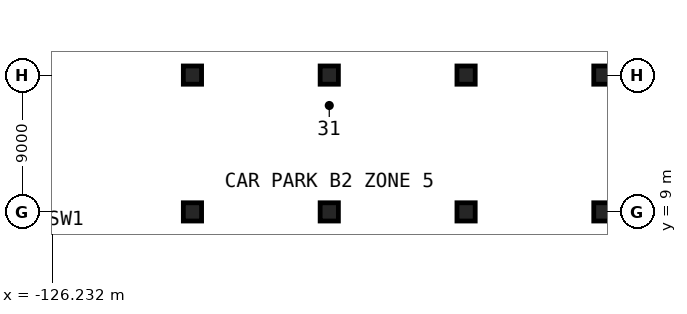
"""IFC4 building model, lengths in metres.
Left out: names, types, materials, properties, quantities, classifications, styles, units other than length and angle.
Written with IfcOpenShell. Run it as: python <this file> out.ifc"""

import sys

from ifc_helpers import new_model, si_unit, direction, frame, origin, origin_2d, place, context, subcontext, project, spatial, rectangle, extrude, element, save


model = new_model("IFC4")
c1 = context("Model", 3, precision=1e-05, world=origin(), true_north=direction((0.0, 1.0)))
c2 = subcontext(c1, "Body", "Model", "MODEL_VIEW")
j1 = project(units=[si_unit("LENGTHUNIT", "METRE"), si_unit("PLANEANGLEUNIT", "RADIAN")], contexts=[c1])
p1 = place(None, origin())
s1 = spatial("IfcSite", under=j1, at=p1, CompositionType="ELEMENT")
p2 = place(p1, origin())
s2 = spatial("IfcBuilding", under=s1, at=p2, CompositionType="ELEMENT")
p3 = place(p2, frame((0.0, 0.0, -9.0)))
s3 = spatial("IfcBuildingStorey", under=s2, at=p3, CompositionType="ELEMENT", Elevation=-9.0)
for number, where, z_axis, x_axis in (
    (1, (-117.0, 9.0, 0.0), (0.0, 0.0, 1.0), (1.0, 0.0, 0.0)),
    (2, (-117.0, 18.0, 0.0), (0.0, 0.0, 1.0), (1.0, 0.0, 0.0)),
    (3, (-108.0, 9.0, 0.0), (0.0, 0.0, 1.0), (1.0, 0.0, 0.0)),
    (4, (-108.0, 18.0, 0.0), (0.0, 0.0, 1.0), (1.0, 0.0, 0.0)),
    (5, (-99.0, 9.0, 0.0), (0.0, 0.0, 1.0), (1.0, 0.0, 0.0)),
    (6, (-99.0, 18.0, 0.0), (0.0, 0.0, 1.0), (1.0, 0.0, 0.0)),
    (7, (-90.0, 9.0, 0.0), (0.0, 0.0, 1.0), (1.0, 0.0, 0.0)),
    (8, (-90.0, 18.0, 0.0), (0.0, 0.0, 1.0), (1.0, 0.0, 0.0)),
):
    element("IfcColumn", number, at=place(p3, frame(where, z_axis=z_axis, x_axis=x_axis)), inside=s3, PredefinedType="COLUMN", context=c2, shape_type="SweptSolid", body=[
        extrude(rectangle(XDim=1.2, YDim=1.2, at=origin_2d()), origin(), (0.0, 0.0, 1.0), 4.5),
    ])
save(model, sys.argv[1])
